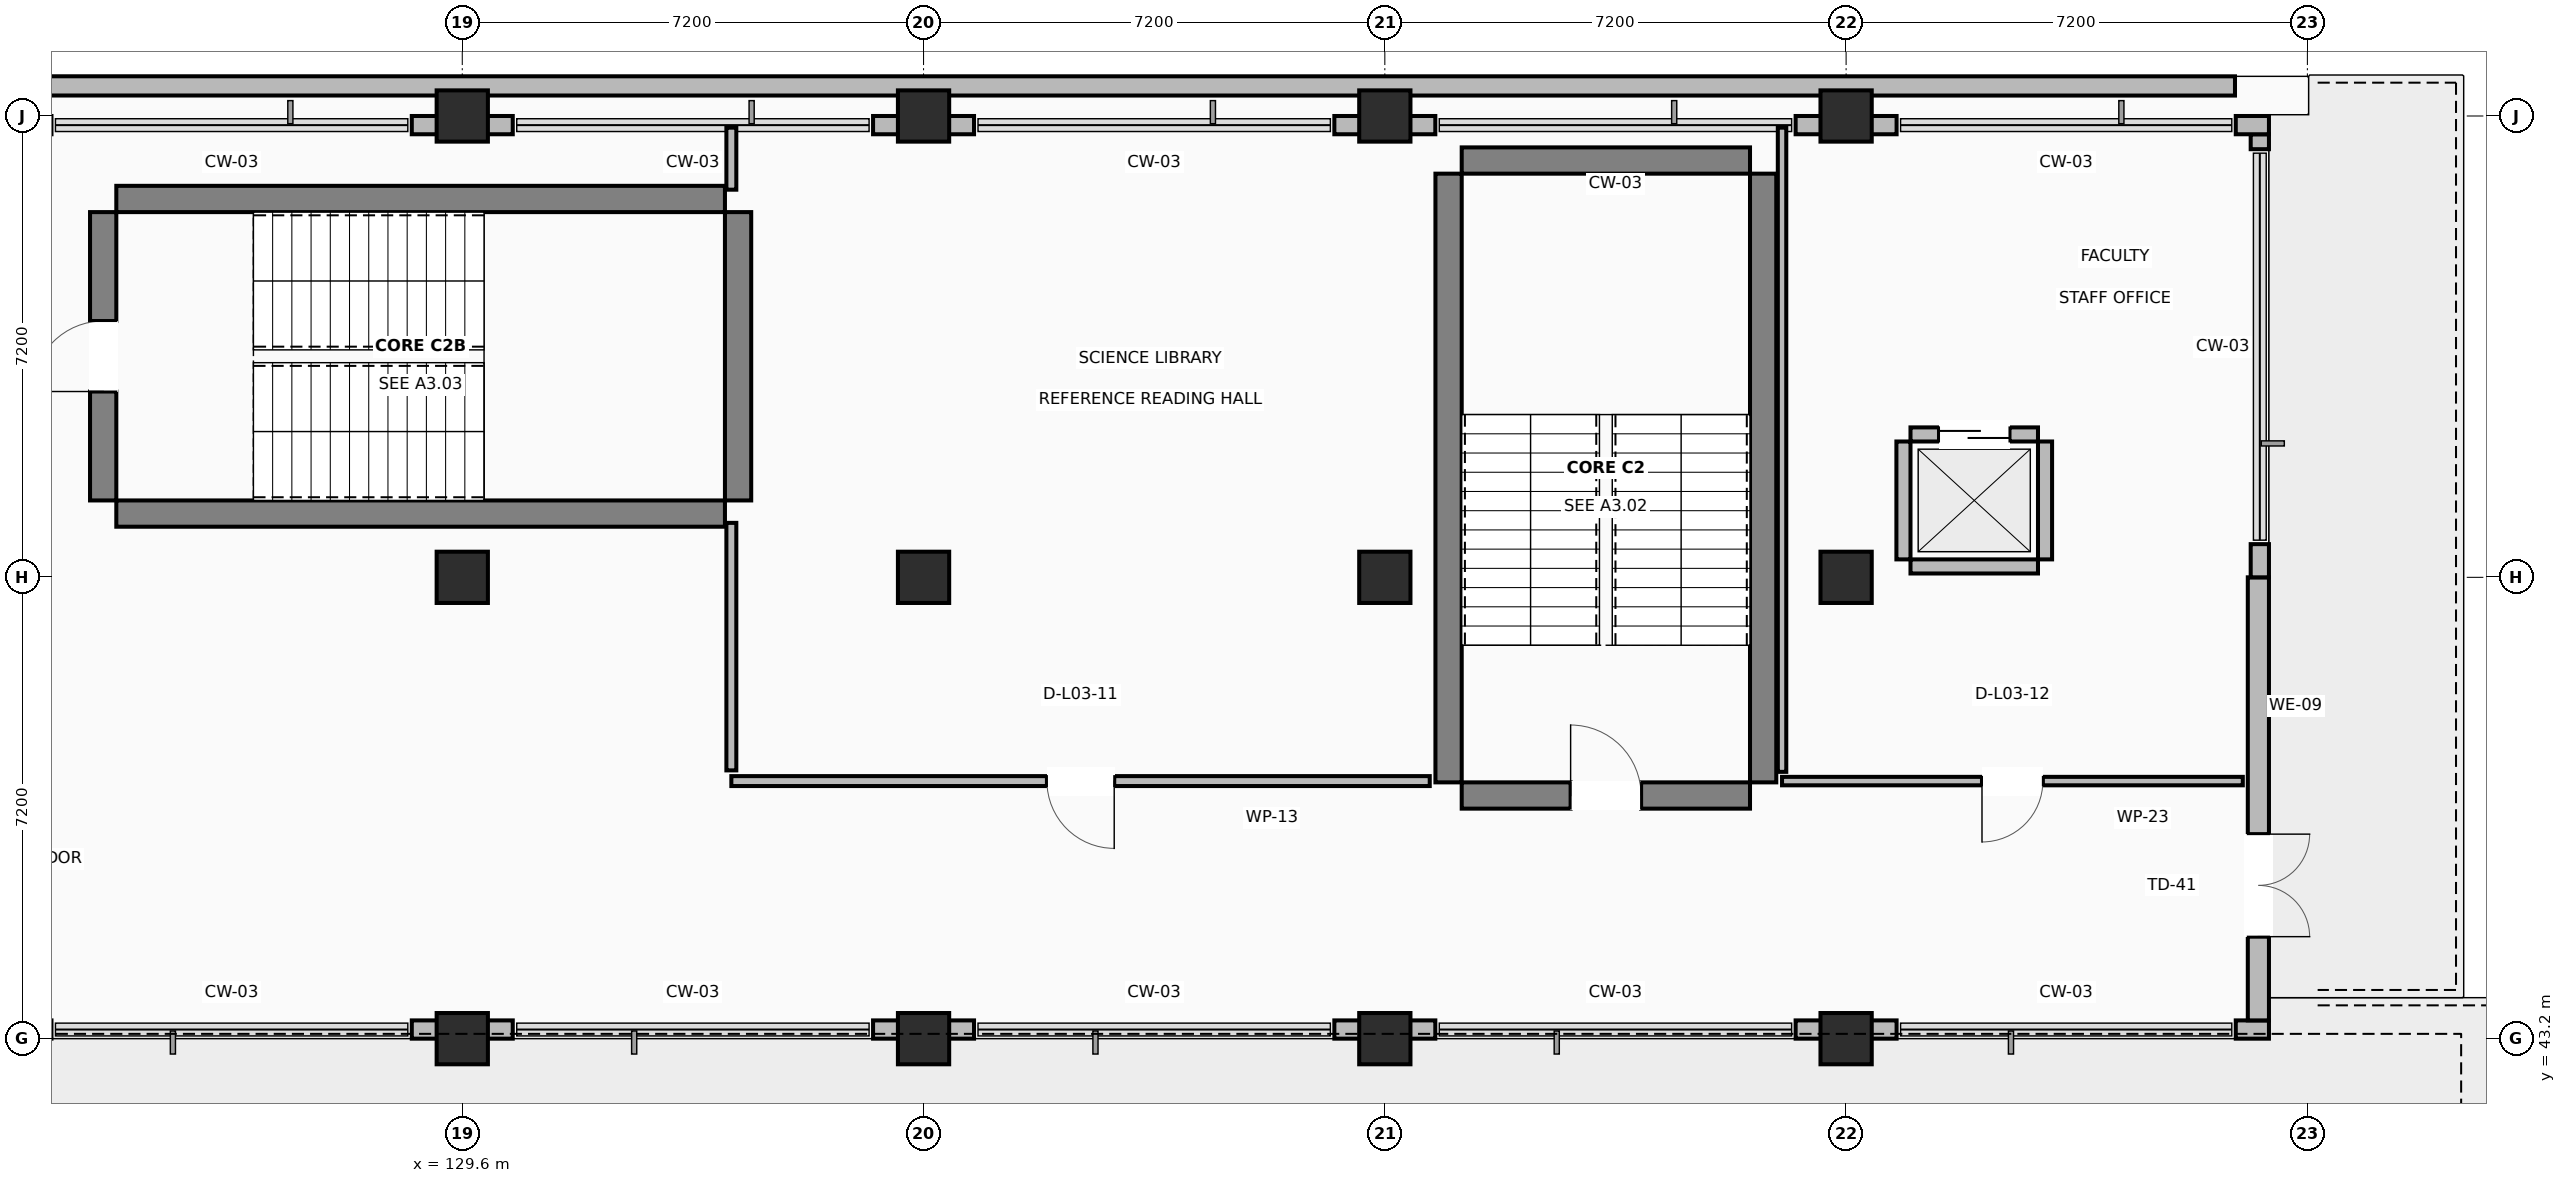
"""IFC4 building model, lengths in metres.
Left out: names, types, materials, properties, quantities, classifications, styles, units other than length and angle.
Written with IfcOpenShell. Run it as: python <this file> out.ifc"""

import sys

from ifc_helpers import new_model, si_unit, direction, frame, frame_2d, origin, origin_2d, place, context, subcontext, project, spatial, rectangle, extrude, element, fill, save


model = new_model("IFC4")
c1 = context("Model", 3, precision=1e-05, world=origin(), true_north=direction((0.0, 1.0)))
c2 = subcontext(c1, "Body", "Model", "MODEL_VIEW")
j1 = project(units=[si_unit("LENGTHUNIT", "METRE"), si_unit("PLANEANGLEUNIT", "RADIAN")], contexts=[c1])
p1 = place(None, origin())
s1 = spatial("IfcSite", under=j1, at=p1, CompositionType="ELEMENT")
p2 = place(p1, origin())
s2 = spatial("IfcBuilding", under=s1, at=p2, CompositionType="ELEMENT")
p3 = place(p2, frame((0.0, 0.0, 13.5)))
s3 = spatial("IfcBuildingStorey", under=s2, at=p3, CompositionType="ELEMENT", Elevation=13.5)
for number, where, z_axis, x_axis in (
    (1, (129.6, 43.2, 0.0), (0.0, 0.0, 1.0), (1.0, 0.0, 0.0)),
    (2, (129.6, 50.4, 0.0), (0.0, 0.0, 1.0), (1.0, 0.0, 0.0)),
    (3, (129.6, 57.6, 0.0), (0.0, 0.0, 1.0), (1.0, 0.0, 0.0)),
    (4, (136.8, 43.2, 0.0), (0.0, 0.0, 1.0), (1.0, 0.0, 0.0)),
    (5, (136.8, 50.4, 0.0), (0.0, 0.0, 1.0), (1.0, 0.0, 0.0)),
    (6, (136.8, 57.6, 0.0), (0.0, 0.0, 1.0), (1.0, 0.0, 0.0)),
    (7, (144.0, 43.2, 0.0), (0.0, 0.0, 1.0), (1.0, 0.0, 0.0)),
    (8, (144.0, 50.4, 0.0), (0.0, 0.0, 1.0), (1.0, 0.0, 0.0)),
    (9, (144.0, 57.6, 0.0), (0.0, 0.0, 1.0), (1.0, 0.0, 0.0)),
    (10, (151.2, 43.2, 0.0), (0.0, 0.0, 1.0), (1.0, 0.0, 0.0)),
    (11, (151.2, 50.4, 0.0), (0.0, 0.0, 1.0), (1.0, 0.0, 0.0)),
    (12, (151.2, 57.6, 0.0), (0.0, 0.0, 1.0), (1.0, 0.0, 0.0)),
):
    element("IfcColumn", number, at=place(p3, frame(where, z_axis=z_axis, x_axis=x_axis)), inside=s3, PredefinedType="COLUMN", context=c2, shape_type="SweptSolid", body=[
        extrude(rectangle(XDim=0.8, YDim=0.8, at=origin_2d()), origin(), (0.0, 0.0, 1.0), 4.22),
    ])
p4 = place(p3, frame((145.2, 46.995, 0.0), z_axis=(0.0, 0.0, 1.0), x_axis=(1.0, 0.0, 0.0)))
e13 = element("IfcWall", 13, at=p4, inside=s3, PredefinedType="SHEAR", context=c2, shape_type="SweptSolid", body=[
    extrude(rectangle(XDim=4.5, YDim=0.41, at=frame_2d((2.25, 0.0))), origin(), (0.0, 0.0, 1.0), 4.22),
])
p5 = place(p4, frame((1.7, 0.0, 0.0)))
e14 = element("IfcOpeningElement", 14, at=p5, cuts=e13, PredefinedType="OPENING", context=c2, shape_type="SweptSolid", body=[
    extrude(rectangle(XDim=1.1, YDim=2.15, at=frame_2d((0.55, 1.075))), frame((0.0, 0.215, 0.0), z_axis=(0.0, -1.0, 0.0), x_axis=(1.0, 0.0, 0.0)), (0.0, 0.0, 1.0), 0.43),
])
p6 = place(p3, frame((145.2, 56.905, 0.0), z_axis=(0.0, 0.0, 1.0), x_axis=(1.0, 0.0, 0.0)))
e15 = element("IfcWall", 15, at=p6, inside=s3, PredefinedType="SHEAR", context=c2, shape_type="SweptSolid", body=[
    extrude(rectangle(XDim=4.5, YDim=0.41, at=frame_2d((2.25, 0.0))), origin(), (0.0, 0.0, 1.0), 4.22),
])
for number, where, z_axis, x_axis in (
    (16, (144.995, 47.2, 0.0), (0.0, 0.0, 1.0), (0.0, 1.0, 0.0)),
    (17, (149.905, 47.2, 0.0), (0.0, 0.0, 1.0), (0.0, 1.0, 0.0)),
    (18, (124.2, 51.395, 0.0), (0.0, 0.0, 1.0), (1.0, 0.0, 0.0)),
    (19, (124.2, 56.305, 0.0), (0.0, 0.0, 1.0), (1.0, 0.0, 0.0)),
):
    element("IfcWall", number, at=place(p3, frame(where, z_axis=z_axis, x_axis=x_axis)), inside=s3, PredefinedType="SHEAR", context=c2, shape_type="SweptSolid", body=[
        extrude(rectangle(XDim=9.5, YDim=0.41, at=frame_2d((4.75, 0.0))), origin(), (0.0, 0.0, 1.0), 4.22),
    ])
p7 = place(p3, frame((123.995, 51.6, 0.0), z_axis=(0.0, 0.0, 1.0), x_axis=(0.0, 1.0, 0.0)))
e20 = element("IfcWall", 20, at=p7, inside=s3, PredefinedType="SHEAR", context=c2, shape_type="SweptSolid", body=[
    extrude(rectangle(XDim=4.5, YDim=0.41, at=frame_2d((2.25, 0.0))), origin(), (0.0, 0.0, 1.0), 4.22),
])
p8 = place(p7, frame((1.7, 0.0, 0.0)))
e21 = element("IfcOpeningElement", 21, at=p8, cuts=e20, PredefinedType="OPENING", context=c2, shape_type="SweptSolid", body=[
    extrude(rectangle(XDim=1.1, YDim=2.15, at=frame_2d((0.55, 1.075))), frame((0.0, 0.215, 0.0), z_axis=(0.0, -1.0, 0.0), x_axis=(1.0, 0.0, 0.0)), (0.0, 0.0, 1.0), 0.43),
])
p9 = place(p3, frame((133.905, 51.6, 0.0), z_axis=(0.0, 0.0, 1.0), x_axis=(0.0, 1.0, 0.0)))
e22 = element("IfcWall", 22, at=p9, inside=s3, PredefinedType="SHEAR", context=c2, shape_type="SweptSolid", body=[
    extrude(rectangle(XDim=4.5, YDim=0.41, at=frame_2d((2.25, 0.0))), origin(), (0.0, 0.0, 1.0), 4.22),
])
for number, where, z_axis, x_axis in (
    (23, (128.812, 43.343, 0.0), (0.0, 0.0, 1.0), (1.0, 0.0, 0.0)),
    (24, (136.012, 43.343, 0.0), (0.0, 0.0, 1.0), (1.0, 0.0, 0.0)),
):
    element("IfcWall", number, at=place(p3, frame(where, z_axis=z_axis, x_axis=x_axis)), inside=s3, PredefinedType="STANDARD", context=c2, shape_type="SweptSolid", body=[
        extrude(rectangle(XDim=1.576, YDim=0.285, at=frame_2d((0.788, 0.0))), origin(), (0.0, 0.0, 1.0), 3.26),
    ])
p10 = place(p3, frame((143.212, 43.343, 0.0), z_axis=(0.0, 0.0, 1.0), x_axis=(1.0, 0.0, 0.0)))
e25 = element("IfcWall", 25, at=p10, inside=s3, PredefinedType="STANDARD", context=c2, shape_type="SweptSolid", body=[
    extrude(rectangle(XDim=1.576, YDim=0.285, at=frame_2d((0.788, 0.0))), origin(), (0.0, 0.0, 1.0), 3.26),
])
p11 = place(p3, frame((150.412, 43.343, 0.0), z_axis=(0.0, 0.0, 1.0), x_axis=(1.0, 0.0, 0.0)))
e26 = element("IfcWall", 26, at=p11, inside=s3, PredefinedType="STANDARD", context=c2, shape_type="SweptSolid", body=[
    extrude(rectangle(XDim=1.576, YDim=0.285, at=frame_2d((0.788, 0.0))), origin(), (0.0, 0.0, 1.0), 3.26),
])
p12 = place(p3, frame((157.282, 43.343, 0.0), z_axis=(0.0, 0.0, 1.0), x_axis=(1.0, 0.0, 0.0)))
e27 = element("IfcWall", 27, at=p12, inside=s3, PredefinedType="STANDARD", context=c2, shape_type="SweptSolid", body=[
    extrude(rectangle(XDim=0.518, YDim=0.285, at=frame_2d((0.259, 0.0))), origin(), (0.0, 0.0, 1.0), 3.26),
])
p13 = place(p3, frame((157.635, 50.4, 0.0), z_axis=(0.0, 0.0, 1.0), x_axis=(0.0, -1.0, 0.0)))
e28 = element("IfcWall", 28, at=p13, inside=s3, PredefinedType="STANDARD", context=c2, shape_type="SweptSolid", body=[
    extrude(rectangle(XDim=6.915, YDim=0.33, at=frame_2d((3.458, 0.0))), origin(), (0.0, 0.0, 1.0), 3.26),
])
p14 = place(p13, frame((4.008, 0.0, 0.0)))
e29 = element("IfcOpeningElement", 29, at=p14, cuts=e28, PredefinedType="OPENING", context=c2, shape_type="SweptSolid", body=[
    extrude(rectangle(XDim=1.6, YDim=2.2, at=frame_2d((0.8, 1.1))), frame((0.0, 0.175, 0.0), z_axis=(0.0, -1.0, 0.0), x_axis=(1.0, 0.0, 0.0)), (0.0, 0.0, 1.0), 0.35),
])
p15 = place(p3, frame((157.657, 50.4, 0.0), z_axis=(0.0, 0.0, 1.0), x_axis=(0.0, 1.0, 0.0)))
e30 = element("IfcWall", 30, at=p15, inside=s3, PredefinedType="STANDARD", context=c2, shape_type="SweptSolid", body=[
    extrude(rectangle(XDim=0.518, YDim=0.285, at=frame_2d((0.259, 0.0))), origin(), (0.0, 0.0, 1.0), 3.26),
])
p16 = place(p3, frame((157.657, 57.082, 0.0), z_axis=(0.0, 0.0, 1.0), x_axis=(0.0, 1.0, 0.0)))
e31 = element("IfcWall", 31, at=p16, inside=s3, PredefinedType="STANDARD", context=c2, shape_type="SweptSolid", body=[
    extrude(rectangle(XDim=0.233, YDim=0.285, at=frame_2d((0.116, 0.0))), origin(), (0.0, 0.0, 1.0), 3.26),
])
p17 = place(p3, frame((157.8, 57.458, 0.0), z_axis=(0.0, 0.0, 1.0), x_axis=(-1.0, 0.0, 0.0)))
e32 = element("IfcWall", 32, at=p17, inside=s3, PredefinedType="STANDARD", context=c2, shape_type="SweptSolid", body=[
    extrude(rectangle(XDim=0.518, YDim=0.285, at=frame_2d((0.259, 0.0))), origin(), (0.0, 0.0, 1.0), 3.26),
])
p18 = place(p3, frame((151.988, 57.458, 0.0), z_axis=(0.0, 0.0, 1.0), x_axis=(-1.0, 0.0, 0.0)))
e33 = element("IfcWall", 33, at=p18, inside=s3, PredefinedType="STANDARD", context=c2, shape_type="SweptSolid", body=[
    extrude(rectangle(XDim=1.576, YDim=0.285, at=frame_2d((0.788, 0.0))), origin(), (0.0, 0.0, 1.0), 3.26),
])
p19 = place(p3, frame((144.788, 57.458, 0.0), z_axis=(0.0, 0.0, 1.0), x_axis=(-1.0, 0.0, 0.0)))
e34 = element("IfcWall", 34, at=p19, inside=s3, PredefinedType="STANDARD", context=c2, shape_type="SweptSolid", body=[
    extrude(rectangle(XDim=1.576, YDim=0.285, at=frame_2d((0.788, 0.0))), origin(), (0.0, 0.0, 1.0), 3.26),
])
for number, where, z_axis, x_axis in (
    (35, (137.588, 57.458, 0.0), (0.0, 0.0, 1.0), (-1.0, 0.0, 0.0)),
    (36, (130.388, 57.458, 0.0), (0.0, 0.0, 1.0), (-1.0, 0.0, 0.0)),
):
    element("IfcWall", number, at=place(p3, frame(where, z_axis=z_axis, x_axis=x_axis)), inside=s3, PredefinedType="STANDARD", context=c2, shape_type="SweptSolid", body=[
        extrude(rectangle(XDim=1.576, YDim=0.285, at=frame_2d((0.788, 0.0))), origin(), (0.0, 0.0, 1.0), 3.26),
    ])
p20 = place(p3, frame((114.58, 58.07, 0.0), z_axis=(0.0, 0.0, 1.0), x_axis=(0.999999999738, -2.2875705e-05, 0.0)))
e37 = element("IfcWall", 37, at=p20, inside=s3, PredefinedType="PARAPET", context=c2, shape_type="SweptSolid", body=[
    extrude(rectangle(XDim=42.69, YDim=0.3, at=frame_2d((21.345, 0.0))), origin(), (0.0, 0.0, 1.0), 1.18),
])
p21 = place(p3, frame((152.205, 50.57, 0.0), z_axis=(0.0, 0.0, 1.0), x_axis=(1.0, 0.0, 0.0)))
e38 = element("IfcWall", 38, at=p21, inside=s3, PredefinedType="STANDARD", context=c2, shape_type="SweptSolid", body=[
    extrude(rectangle(XDim=1.99, YDim=0.22, at=frame_2d((0.995, 0.0))), origin(), (0.0, 0.0, 1.0), 3.26),
])
p22 = place(p3, frame((152.205, 52.63, 0.0), z_axis=(0.0, 0.0, 1.0), x_axis=(1.0, 0.0, 0.0)))
e39 = element("IfcWall", 39, at=p22, inside=s3, PredefinedType="STANDARD", context=c2, shape_type="SweptSolid", body=[
    extrude(rectangle(XDim=1.99, YDim=0.22, at=frame_2d((0.995, 0.0))), origin(), (0.0, 0.0, 1.0), 3.26),
])
p23 = place(p22, frame((0.445, 0.0, 0.0)))
e40 = element("IfcOpeningElement", 40, at=p23, cuts=e39, PredefinedType="OPENING", context=c2, shape_type="SweptSolid", body=[
    extrude(rectangle(XDim=1.1, YDim=2.15, at=frame_2d((0.55, 1.075))), frame((0.0, 0.12, 0.0), z_axis=(0.0, -1.0, 0.0), x_axis=(1.0, 0.0, 0.0)), (0.0, 0.0, 1.0), 0.24),
])
for number, where, z_axis, x_axis in (
    (41, (152.095, 50.68, 0.0), (0.0, 0.0, 1.0), (0.0, 1.0, 0.0)),
    (42, (154.305, 50.68, 0.0), (0.0, 0.0, 1.0), (0.0, 1.0, 0.0)),
):
    element("IfcWall", number, at=place(p3, frame(where, z_axis=z_axis, x_axis=x_axis)), inside=s3, PredefinedType="STANDARD", context=c2, shape_type="SweptSolid", body=[
        extrude(rectangle(XDim=1.84, YDim=0.22, at=frame_2d((0.92, 0.0))), origin(), (0.0, 0.0, 1.0), 3.26),
    ])
p24 = place(p3, frame((144.701, 47.22, 0.0), z_axis=(0.0, 0.0, 1.0), x_axis=(-1.0, 0.0, 0.0)))
e43 = element("IfcWall", 43, at=p24, inside=s3, PredefinedType="PARTITIONING", context=c2, shape_type="SweptSolid", body=[
    extrude(rectangle(XDim=10.901, YDim=0.155, at=frame_2d((5.45, 0.0))), origin(), (0.0, 0.0, 1.0), 3.26),
])
p25 = place(p24, frame((4.925, 0.0, 0.0)))
e44 = element("IfcOpeningElement", 44, at=p25, cuts=e43, PredefinedType="OPENING", context=c2, shape_type="SweptSolid", body=[
    extrude(rectangle(XDim=1.05, YDim=2.15, at=frame_2d((0.525, 1.075))), frame((0.0, 0.087, 0.0), z_axis=(0.0, -1.0, 0.0), x_axis=(1.0, 0.0, 0.0)), (0.0, 0.0, 1.0), 0.175),
])
p26 = place(p3, frame((133.8, 47.387, 0.0), z_axis=(0.0, 0.0, 1.0), x_axis=(0.0, 1.0, 0.0)))
e45 = element("IfcWall", 45, at=p26, inside=s3, PredefinedType="PARTITIONING", context=c2, shape_type="SweptSolid", body=[
    extrude(rectangle(XDim=3.863, YDim=0.155, at=frame_2d((1.932, 0.0))), origin(), (0.0, 0.0, 1.0), 3.26),
])
p27 = place(p3, frame((133.8, 56.45, 0.0), z_axis=(0.0, 0.0, 1.0), x_axis=(0.0, 1.0, 0.0)))
e46 = element("IfcWall", 46, at=p27, inside=s3, PredefinedType="PARTITIONING", context=c2, shape_type="SweptSolid", body=[
    extrude(rectangle(XDim=0.968, YDim=0.155, at=frame_2d((0.484, 0.0))), origin(), (0.0, 0.0, 1.0), 3.26),
])
p28 = place(p3, frame((157.392, 47.22, 0.0), z_axis=(0.0, 0.0, 1.0), x_axis=(-1.0, 0.0, 0.0)))
e47 = element("IfcWall", 47, at=p28, inside=s3, PredefinedType="PARTITIONING", context=c2, shape_type="SweptSolid", body=[
    extrude(rectangle(XDim=7.192, YDim=0.132, at=frame_2d((3.596, 0.0))), origin(), (0.0, 0.0, 1.0), 3.26),
])
p29 = place(p28, frame((3.121, 0.0, 0.0)))
e48 = element("IfcOpeningElement", 48, at=p29, cuts=e47, PredefinedType="OPENING", context=c2, shape_type="SweptSolid", body=[
    extrude(rectangle(XDim=0.95, YDim=2.1, at=frame_2d((0.475, 1.05))), frame((0.0, 0.076, 0.0), z_axis=(0.0, -1.0, 0.0), x_axis=(1.0, 0.0, 0.0)), (0.0, 0.0, 1.0), 0.152),
])
p30 = place(p3, frame((150.2, 47.364, 0.0), z_axis=(0.0, 0.0, 1.0), x_axis=(0.0, 1.0, 0.0)))
e49 = element("IfcWall", 49, at=p30, inside=s3, PredefinedType="PARTITIONING", context=c2, shape_type="SweptSolid", body=[
    extrude(rectangle(XDim=10.054, YDim=0.132, at=frame_2d((5.027, 0.0))), origin(), (0.0, 0.0, 1.0), 3.26),
])
p31 = place(p14, origin())
e50 = element("IfcDoor", 50, at=p31, inside=s3, OperationType="DOUBLE_DOOR_SINGLE_SWING", PredefinedType="DOOR", context=c2, shape_type="SweptSolid", body=[
    extrude(rectangle(XDim=1.6, YDim=2.2, at=frame_2d((0.8, 1.1))), frame((0.0, 0.025, 0.0), z_axis=(0.0, -1.0, 0.0), x_axis=(1.0, 0.0, 0.0)), (0.0, 0.0, 1.0), 0.05),
])
fill(e29, e50)
p32 = place(p5, origin())
e51 = element("IfcDoor", 51, at=p32, inside=s3, OperationType="SINGLE_SWING_LEFT", PredefinedType="DOOR", context=c2, shape_type="SweptSolid", body=[
    extrude(rectangle(XDim=1.1, YDim=2.15, at=frame_2d((0.55, 1.075))), frame((0.0, 0.025, 0.0), z_axis=(0.0, -1.0, 0.0), x_axis=(1.0, 0.0, 0.0)), (0.0, 0.0, 1.0), 0.05),
])
fill(e14, e51)
p33 = place(p8, origin())
e52 = element("IfcDoor", 52, at=p33, inside=s3, OperationType="SINGLE_SWING_LEFT", PredefinedType="DOOR", context=c2, shape_type="SweptSolid", body=[
    extrude(rectangle(XDim=1.1, YDim=2.15, at=frame_2d((0.55, 1.075))), frame((0.0, 0.025, 0.0), z_axis=(0.0, -1.0, 0.0), x_axis=(1.0, 0.0, 0.0)), (0.0, 0.0, 1.0), 0.05),
])
fill(e21, e52)
p34 = place(p23, origin())
e53 = element("IfcDoor", 53, at=p34, inside=s3, OperationType="SLIDING_TO_LEFT", PredefinedType="DOOR", context=c2, shape_type="SweptSolid", body=[
    extrude(rectangle(XDim=1.1, YDim=2.15, at=frame_2d((0.55, 1.075))), frame((0.0, 0.025, 0.0), z_axis=(0.0, -1.0, 0.0), x_axis=(1.0, 0.0, 0.0)), (0.0, 0.0, 1.0), 0.05),
])
fill(e40, e53)
p35 = place(p25, origin())
e54 = element("IfcDoor", 54, at=p35, inside=s3, OperationType="SINGLE_SWING_LEFT", PredefinedType="DOOR", context=c2, shape_type="SweptSolid", body=[
    extrude(rectangle(XDim=1.05, YDim=2.15, at=frame_2d((0.525, 1.075))), frame((0.0, 0.025, 0.0), z_axis=(0.0, -1.0, 0.0), x_axis=(1.0, 0.0, 0.0)), (0.0, 0.0, 1.0), 0.05),
])
fill(e44, e54)
p36 = place(p29, origin())
e55 = element("IfcDoor", 55, at=p36, inside=s3, OperationType="SINGLE_SWING_RIGHT", PredefinedType="DOOR", context=c2, shape_type="SweptSolid", body=[
    extrude(rectangle(XDim=0.95, YDim=2.1, at=frame_2d((0.475, 1.05))), frame((0.0, 0.025, 0.0), z_axis=(0.0, -1.0, 0.0), x_axis=(1.0, 0.0, 0.0)), (0.0, 0.0, 1.0), 0.05),
])
fill(e48, e55)
save(model, sys.argv[1])
